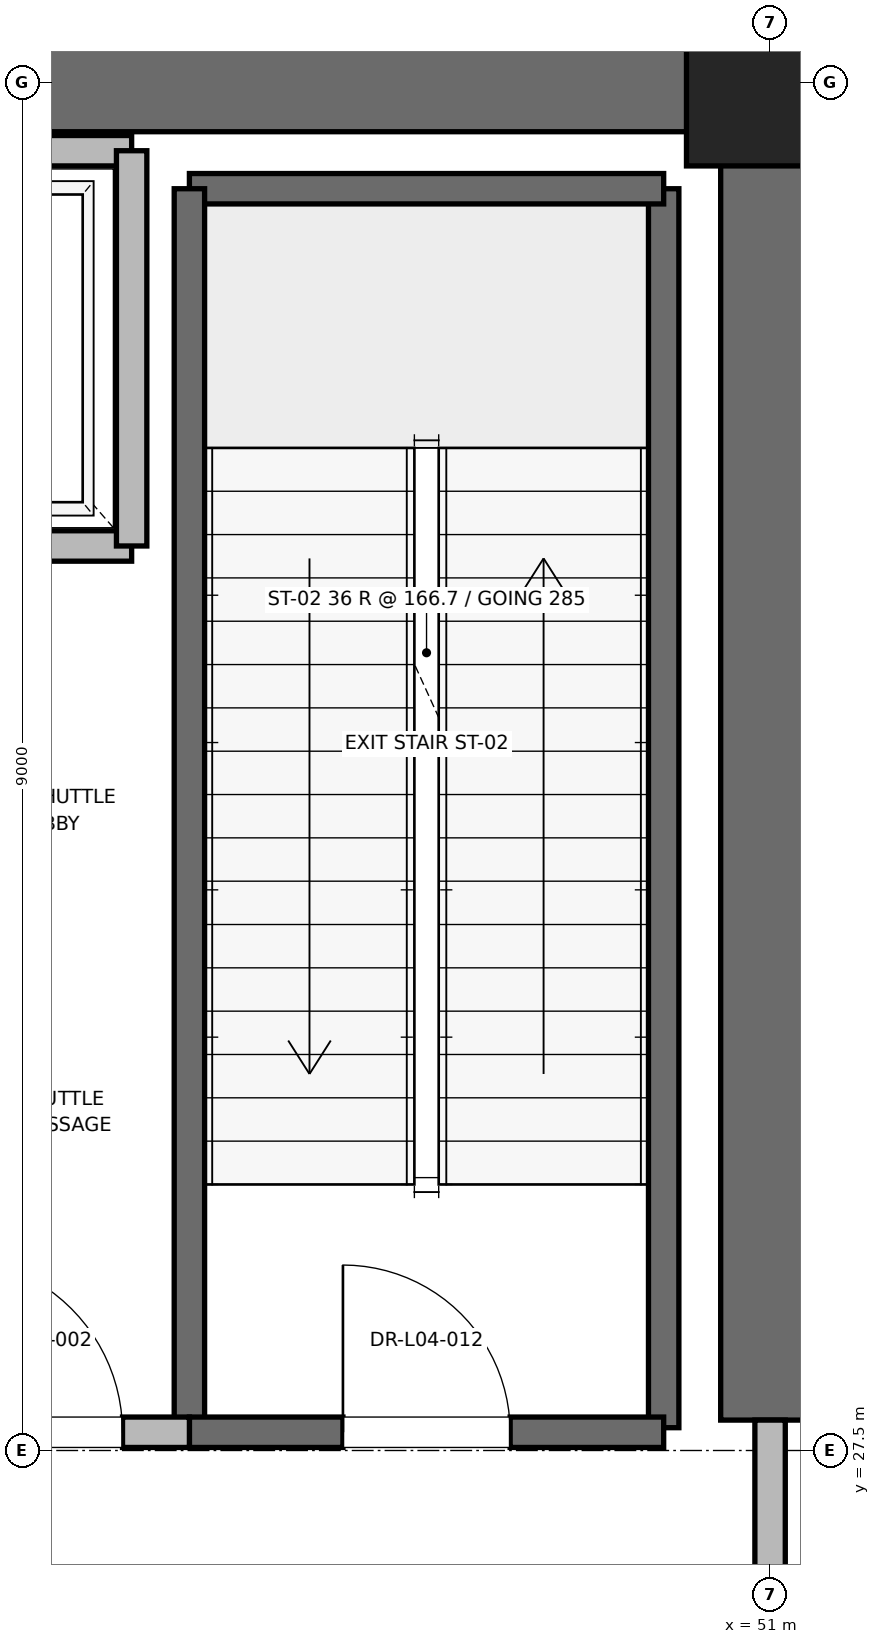
"""IFC4 building model, lengths in metres.
Left out: names, types, materials, properties, quantities, classifications, styles, units other than length and angle.
Written with IfcOpenShell. Run it as: python <this file> out.ifc"""

import sys

from ifc_helpers import new_model, si_unit, direction, frame, frame_2d, origin, origin_2d, place, context, subcontext, project, spatial, rectangle, extrude, element, fill, save


model = new_model("IFC4")
c1 = context("Model", 3, precision=1e-05, world=origin(), true_north=direction((0.0, 1.0)))
c2 = subcontext(c1, "Body", "Model", "MODEL_VIEW")
j1 = project(units=[si_unit("LENGTHUNIT", "METRE"), si_unit("PLANEANGLEUNIT", "RADIAN")], contexts=[c1])
p1 = place(None, origin())
s1 = spatial("IfcSite", under=j1, at=p1, CompositionType="ELEMENT")
p2 = place(p1, origin())
s2 = spatial("IfcBuilding", under=s1, at=p2, CompositionType="ELEMENT")
p3 = place(p2, frame((0.0, 0.0, 21.6)))
s3 = spatial("IfcBuildingStorey", under=s2, at=p3, CompositionType="ELEMENT", Elevation=21.6)
p4 = place(p3, frame((51.0, 36.5, 0.0), z_axis=(0.0, 0.0, 1.0), x_axis=(1.0, 0.0, 0.0)))
e1 = element("IfcColumn", 1, at=p4, inside=s3, PredefinedType="PILASTER", context=c2, shape_type="SweptSolid", body=[
    extrude(rectangle(XDim=1.1, YDim=1.1, at=origin_2d()), origin(), (0.0, 0.0, 1.0), 6.0),
])
p5 = place(p3, frame((45.2, 36.5, 0.0), z_axis=(0.0, 0.0, 1.0), x_axis=(1.0, 0.0, 0.0)))
e2 = element("IfcWall", 2, at=p5, inside=s3, PredefinedType="SHEAR", context=c2, shape_type="SweptSolid", body=[
    extrude(rectangle(XDim=5.8, YDim=0.65, at=frame_2d((2.9, 0.0))), origin(), (0.0, 0.0, 1.0), 5.76),
])
p6 = place(p3, frame((51.0, 27.7, 0.0), z_axis=(0.0, 0.0, 1.0), x_axis=(0.0, 1.0, 0.0)))
e3 = element("IfcWall", 3, at=p6, inside=s3, PredefinedType="SHEAR", context=c2, shape_type="SweptSolid", body=[
    extrude(rectangle(XDim=8.8, YDim=0.65, at=frame_2d((4.4, 0.0))), origin(), (0.0, 0.0, 1.0), 5.76),
])
p7 = place(p3, frame((50.3, 27.65, 0.0), z_axis=(0.0, 0.0, 1.0), x_axis=(0.0, 1.0, 0.0)))
e4 = element("IfcWall", 4, at=p7, inside=s3, PredefinedType="SOLIDWALL", context=c2, shape_type="SweptSolid", body=[
    extrude(rectangle(XDim=8.15, YDim=0.2, at=frame_2d((4.075, 0.0))), origin(), (0.0, 0.0, 1.0), 5.76),
])
p8 = place(p3, frame((47.18, 35.8, 0.0), z_axis=(0.0, 0.0, 1.0), x_axis=(1.0, 0.0, 0.0)))
e5 = element("IfcWall", 5, at=p8, inside=s3, PredefinedType="SOLIDWALL", context=c2, shape_type="SweptSolid", body=[
    extrude(rectangle(XDim=3.12, YDim=0.2, at=frame_2d((1.56, 0.0))), origin(), (0.0, 0.0, 1.0), 5.76),
])
p9 = place(p3, frame((47.18, 27.62, 0.0), z_axis=(0.0, 0.0, 1.0), x_axis=(0.0, 1.0, 0.0)))
e6 = element("IfcWall", 6, at=p9, inside=s3, PredefinedType="SOLIDWALL", context=c2, shape_type="SweptSolid", body=[
    extrude(rectangle(XDim=8.18, YDim=0.2, at=frame_2d((4.09, 0.0))), origin(), (0.0, 0.0, 1.0), 5.76),
])
p10 = place(p3, frame((47.18, 27.62, 0.0), z_axis=(0.0, 0.0, 1.0), x_axis=(1.0, 0.0, 0.0)))
e7 = element("IfcWall", 7, at=p10, inside=s3, PredefinedType="SOLIDWALL", context=c2, shape_type="SweptSolid", body=[
    extrude(rectangle(XDim=3.12, YDim=0.2, at=frame_2d((1.56, 0.0))), origin(), (0.0, 0.0, 1.0), 5.76),
])
p11 = place(p10, frame((1.01, 0.0, 0.0)))
e8 = element("IfcOpeningElement", 8, at=p11, cuts=e7, PredefinedType="OPENING", context=c2, shape_type="SweptSolid", body=[
    extrude(rectangle(XDim=1.1, YDim=2.15, at=frame_2d((0.55, 1.075))), frame((0.0, 0.1, 0.0), z_axis=(0.0, -1.0, 0.0), x_axis=(1.0, 0.0, 0.0)), (0.0, 0.0, 1.0), 0.2),
])
p12 = place(p3, frame((45.15, 27.62, 0.0), z_axis=(0.0, 0.0, 1.0), x_axis=(1.0, 0.0, 0.0)))
e9 = element("IfcWall", 9, at=p12, inside=s3, PredefinedType="PARTITIONING", context=c2, shape_type="SweptSolid", body=[
    extrude(rectangle(XDim=2.03, YDim=0.2, at=frame_2d((1.015, 0.0))), origin(), (0.0, 0.0, 1.0), 5.76),
])
p13 = place(p12, frame((0.44, 0.0, 0.0)))
e10 = element("IfcOpeningElement", 10, at=p13, cuts=e9, PredefinedType="OPENING", context=c2, shape_type="SweptSolid", body=[
    extrude(rectangle(XDim=1.15, YDim=2.2, at=frame_2d((0.575, 1.1))), frame((0.0, 0.1, 0.0), z_axis=(0.0, -1.0, 0.0), x_axis=(1.0, 0.0, 0.0)), (0.0, 0.0, 1.0), 0.2),
])
p14 = place(p3, frame((51.0, 24.3, 0.0), z_axis=(0.0, 0.0, 1.0), x_axis=(0.0, 1.0, 0.0)))
e11 = element("IfcWall", 11, at=p14, inside=s3, PredefinedType="PARTITIONING", context=c2, shape_type="SweptSolid", body=[
    extrude(rectangle(XDim=3.4, YDim=0.2, at=frame_2d((1.7, 0.0))), origin(), (0.0, 0.0, 1.0), 4.54),
])
p15 = place(p14, frame((1.125, 0.0, 0.0)))
e12 = element("IfcOpeningElement", 12, at=p15, cuts=e11, PredefinedType="OPENING", context=c2, shape_type="SweptSolid", body=[
    extrude(rectangle(XDim=1.15, YDim=2.2, at=frame_2d((0.575, 1.1))), frame((0.0, 0.1, 0.0), z_axis=(0.0, -1.0, 0.0), x_axis=(1.0, 0.0, 0.0)), (0.0, 0.0, 1.0), 0.2),
])
p16 = place(p3, frame((44.5, 33.45, 0.0), z_axis=(0.0, 0.0, 1.0), x_axis=(1.0, 0.0, 0.0)))
e13 = element("IfcWall", 13, at=p16, inside=s3, PredefinedType="SOLIDWALL", context=c2, shape_type="SweptSolid", body=[
    extrude(rectangle(XDim=2.3, YDim=0.2, at=frame_2d((1.15, 0.0))), origin(), (0.0, 0.0, 1.0), 5.76),
])
p17 = place(p16, frame((0.6, 0.0, 0.0)))
e14 = element("IfcOpeningElement", 14, at=p17, cuts=e13, PredefinedType="OPENING", context=c2, shape_type="SweptSolid", body=[
    extrude(rectangle(XDim=1.1, YDim=2.2, at=frame_2d((0.55, 1.1))), frame((0.0, 0.1, 0.0), z_axis=(0.0, -1.0, 0.0), x_axis=(1.0, 0.0, 0.0)), (0.0, 0.0, 1.0), 0.2),
])
p18 = place(p3, frame((46.8, 36.05, 0.0), z_axis=(0.0, 0.0, 1.0), x_axis=(-1.0, 0.0, 0.0)))
e15 = element("IfcWall", 15, at=p18, inside=s3, PredefinedType="SOLIDWALL", context=c2, shape_type="SweptSolid", body=[
    extrude(rectangle(XDim=2.3, YDim=0.2, at=frame_2d((1.15, 0.0))), origin(), (0.0, 0.0, 1.0), 4.54),
])
p19 = place(p3, frame((46.8, 33.45, 0.0), z_axis=(0.0, 0.0, 1.0), x_axis=(0.0, 1.0, 0.0)))
e16 = element("IfcWall", 16, at=p19, inside=s3, PredefinedType="SOLIDWALL", context=c2, shape_type="SweptSolid", body=[
    extrude(rectangle(XDim=2.6, YDim=0.2, at=frame_2d((1.3, 0.0))), origin(), (0.0, 0.0, 1.0), 5.76),
])
p20 = place(p11, origin())
e17 = element("IfcDoor", 17, at=p20, inside=s3, OperationType="SINGLE_SWING_LEFT", PredefinedType="DOOR", context=c2, shape_type="SweptSolid", body=[
    extrude(rectangle(XDim=1.1, YDim=2.15, at=frame_2d((0.55, 1.075))), frame((0.0, 0.025, 0.0), z_axis=(0.0, -1.0, 0.0), x_axis=(1.0, 0.0, 0.0)), (0.0, 0.0, 1.0), 0.05),
])
fill(e8, e17)
p21 = place(p13, origin())
e18 = element("IfcDoor", 18, at=p21, inside=s3, OperationType="SINGLE_SWING_LEFT", PredefinedType="DOOR", context=c2, shape_type="SweptSolid", body=[
    extrude(rectangle(XDim=1.15, YDim=2.2, at=frame_2d((0.575, 1.1))), frame((0.0, 0.025, 0.0), z_axis=(0.0, -1.0, 0.0), x_axis=(1.0, 0.0, 0.0)), (0.0, 0.0, 1.0), 0.05),
])
fill(e10, e18)
save(model, sys.argv[1])
